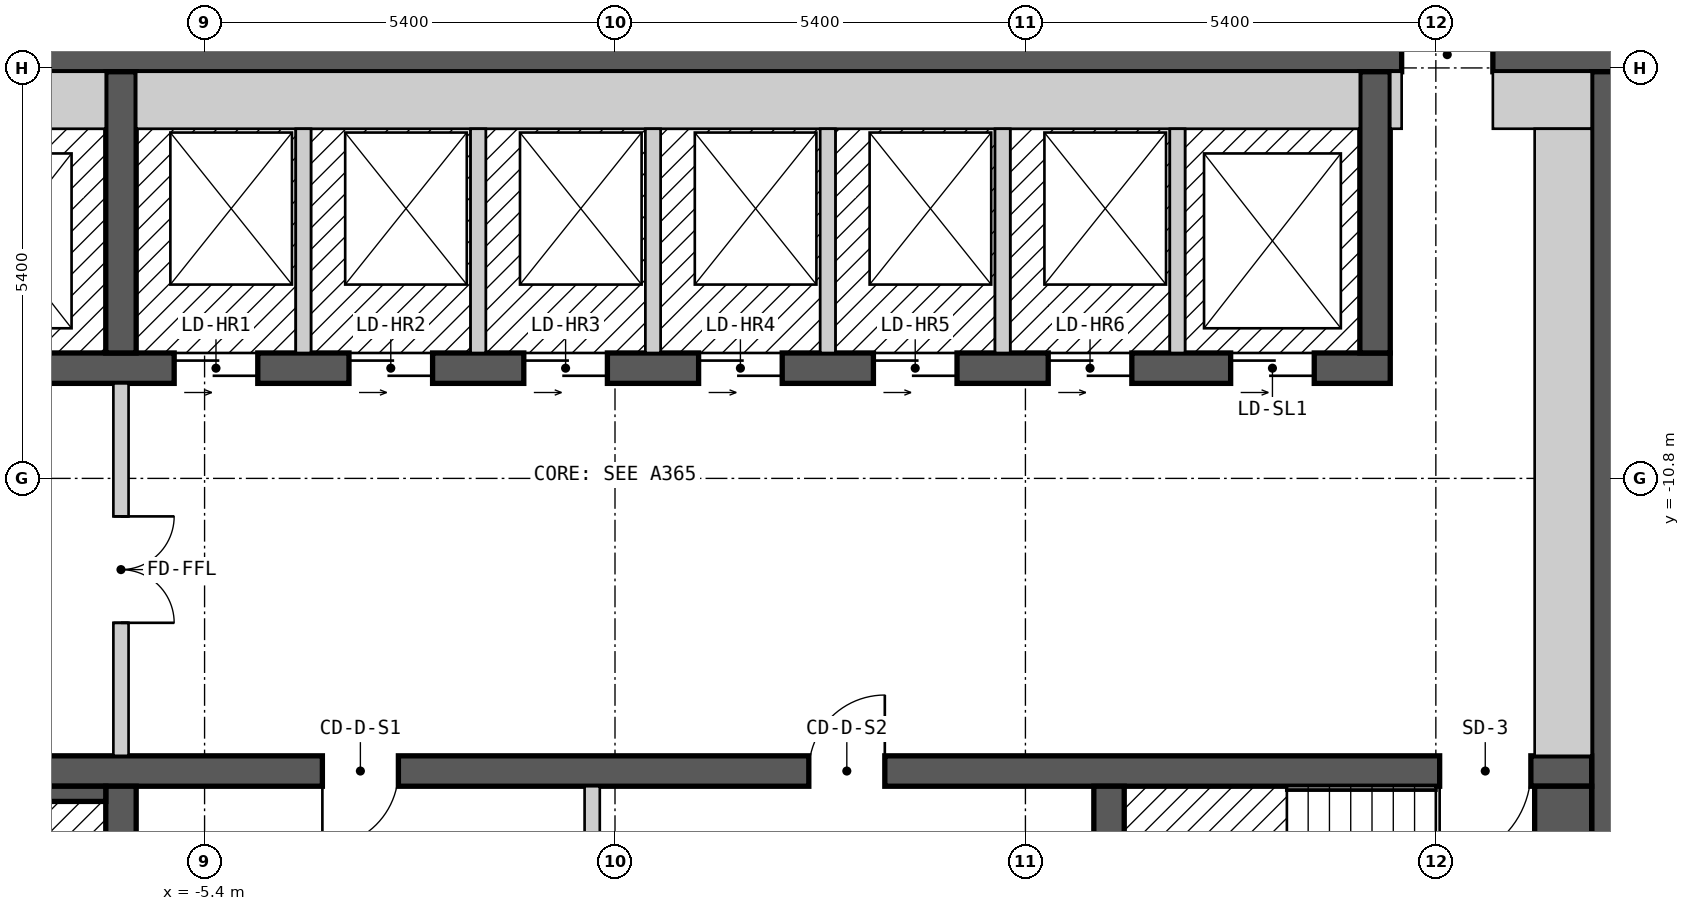
"""IFC4 building model, lengths in metres.
Left out: names, types, materials, properties, quantities, classifications, styles, units other than length and angle.
Written with IfcOpenShell. Run it as: python <this file> out.ifc"""

import sys

from ifc_helpers import new_model, si_unit, direction, frame, frame_2d, origin, place, context, subcontext, project, spatial, rectangle, extrude, element, fill, save


model = new_model("IFC4")
c1 = context("Model", 3, precision=1e-05, world=origin(), true_north=direction((0.0, 1.0)))
c2 = subcontext(c1, "Body", "Model", "MODEL_VIEW")
j1 = project(units=[si_unit("LENGTHUNIT", "METRE"), si_unit("PLANEANGLEUNIT", "RADIAN")], contexts=[c1])
p1 = place(None, origin())
s1 = spatial("IfcSite", under=j1, at=p1, CompositionType="ELEMENT")
p2 = place(p1, origin())
s2 = spatial("IfcBuilding", under=s1, at=p2, CompositionType="ELEMENT")
p3 = place(p2, frame((0.0, 0.0, 238.8)))
s3 = spatial("IfcBuildingStorey", under=s2, at=p3, CompositionType="ELEMENT", Elevation=238.8)
p4 = place(p3, frame((-13.3, -5.225, 0.0), z_axis=(0.0, 0.0, 1.0), x_axis=(1.0, 0.0, 0.0)))
e1 = element("IfcWall", 1, at=p4, inside=s3, PredefinedType="SHEAR", context=c2, shape_type="SweptSolid", body=[
    extrude(rectangle(XDim=26.6, YDim=0.45, at=frame_2d((13.3, 0.0))), origin(), (0.0, 0.0, 1.0), 2.7),
])
p5 = place(p4, frame((23.65, 0.0, 0.0)))
e2 = element("IfcOpeningElement", 2, at=p5, cuts=e1, PredefinedType="OPENING", context=c2, shape_type="SweptSolid", body=[
    extrude(rectangle(XDim=1.2, YDim=2.1, at=frame_2d((0.6, 1.05))), frame((0.0, 0.235, 0.0), z_axis=(0.0, -1.0, 0.0), x_axis=(1.0, 0.0, 0.0)), (0.0, 0.0, 1.0), 0.47),
])
p6 = place(p3, frame((13.075, -18.55, 0.0), z_axis=(0.0, 0.0, 1.0), x_axis=(0.0, 1.0, 0.0)))
e3 = element("IfcWall", 3, at=p6, inside=s3, PredefinedType="SHEAR", context=c2, shape_type="SweptSolid", body=[
    extrude(rectangle(XDim=13.1, YDim=0.45, at=frame_2d((6.55, 0.0))), origin(), (0.0, 0.0, 1.0), 2.7),
])
p7 = place(p3, frame((-12.85, -14.65, 0.0), z_axis=(0.0, 0.0, 1.0), x_axis=(1.0, 0.0, 0.0)))
e4 = element("IfcWall", 4, at=p7, inside=s3, PredefinedType="SHEAR", context=c2, shape_type="SweptSolid", body=[
    extrude(rectangle(XDim=25.7, YDim=0.4, at=frame_2d((12.85, 0.0))), origin(), (0.0, 0.0, 1.0), 2.7),
])
p8 = place(p7, frame((2.05, 0.0, 0.0), z_axis=(0.0, 0.0, 1.0), x_axis=(-1.0, 0.0, 0.0)))
e5 = element("IfcOpeningElement", 5, at=p8, cuts=e4, PredefinedType="OPENING", context=c2, shape_type="SweptSolid", body=[
    extrude(rectangle(XDim=1.2, YDim=2.1, at=frame_2d((0.6, 1.05))), frame((0.0, 0.21, 0.0), z_axis=(0.0, -1.0, 0.0), x_axis=(1.0, 0.0, 0.0)), (0.0, 0.0, 1.0), 0.42),
])
p9 = place(p7, frame((24.9, 0.0, 0.0), z_axis=(0.0, 0.0, 1.0), x_axis=(-1.0, 0.0, 0.0)))
e6 = element("IfcOpeningElement", 6, at=p9, cuts=e4, PredefinedType="OPENING", context=c2, shape_type="SweptSolid", body=[
    extrude(rectangle(XDim=1.2, YDim=2.1, at=frame_2d((0.6, 1.05))), frame((0.0, 0.21, 0.0), z_axis=(0.0, -1.0, 0.0), x_axis=(1.0, 0.0, 0.0)), (0.0, 0.0, 1.0), 0.42),
])
p10 = place(p7, frame((10.0, 0.0, 0.0), z_axis=(0.0, 0.0, 1.0), x_axis=(-1.0, 0.0, 0.0)))
e7 = element("IfcOpeningElement", 7, at=p10, cuts=e4, PredefinedType="OPENING", context=c2, shape_type="SweptSolid", body=[
    extrude(rectangle(XDim=1.0, YDim=2.1, at=frame_2d((0.5, 1.05))), frame((0.0, 0.21, 0.0), z_axis=(0.0, -1.0, 0.0), x_axis=(1.0, 0.0, 0.0)), (0.0, 0.0, 1.0), 0.42),
])
p11 = place(p7, frame((16.4, 0.0, 0.0), z_axis=(0.0, 0.0, 1.0), x_axis=(-1.0, 0.0, 0.0)))
e8 = element("IfcOpeningElement", 8, at=p11, cuts=e4, PredefinedType="OPENING", context=c2, shape_type="SweptSolid", body=[
    extrude(rectangle(XDim=1.0, YDim=2.1, at=frame_2d((0.5, 1.05))), frame((0.0, 0.21, 0.0), z_axis=(0.0, -1.0, 0.0), x_axis=(1.0, 0.0, 0.0)), (0.0, 0.0, 1.0), 0.42),
])
p12 = place(p3, frame((-12.85, -9.35, 0.0), z_axis=(0.0, 0.0, 1.0), x_axis=(1.0, 0.0, 0.0)))
e9 = element("IfcWall", 9, at=p12, inside=s3, PredefinedType="SHEAR", context=c2, shape_type="SweptSolid", body=[
    extrude(rectangle(XDim=23.05, YDim=0.4, at=frame_2d((11.525, 0.0))), origin(), (0.0, 0.0, 1.0), 2.7),
])
p13 = place(p12, frame((1.45, 0.0, 0.0)))
e10 = element("IfcOpeningElement", 10, at=p13, cuts=e9, PredefinedType="OPENING", context=c2, shape_type="SweptSolid", body=[
    extrude(rectangle(XDim=1.1, YDim=2.1, at=frame_2d((0.55, 1.05))), frame((0.0, 0.21, 0.0), z_axis=(0.0, -1.0, 0.0), x_axis=(1.0, 0.0, 0.0)), (0.0, 0.0, 1.0), 0.42),
])
p14 = place(p12, frame((4.25, 0.0, 0.0)))
e11 = element("IfcOpeningElement", 11, at=p14, cuts=e9, PredefinedType="OPENING", context=c2, shape_type="SweptSolid", body=[
    extrude(rectangle(XDim=1.1, YDim=2.1, at=frame_2d((0.55, 1.05))), frame((0.0, 0.21, 0.0), z_axis=(0.0, -1.0, 0.0), x_axis=(1.0, 0.0, 0.0)), (0.0, 0.0, 1.0), 0.42),
])
p15 = place(p12, frame((7.05, 0.0, 0.0)))
e12 = element("IfcOpeningElement", 12, at=p15, cuts=e9, PredefinedType="OPENING", context=c2, shape_type="SweptSolid", body=[
    extrude(rectangle(XDim=1.1, YDim=2.1, at=frame_2d((0.55, 1.05))), frame((0.0, 0.21, 0.0), z_axis=(0.0, -1.0, 0.0), x_axis=(1.0, 0.0, 0.0)), (0.0, 0.0, 1.0), 0.42),
])
p16 = place(p12, frame((9.35, 0.0, 0.0)))
e13 = element("IfcOpeningElement", 13, at=p16, cuts=e9, PredefinedType="OPENING", context=c2, shape_type="SweptSolid", body=[
    extrude(rectangle(XDim=1.1, YDim=2.1, at=frame_2d((0.55, 1.05))), frame((0.0, 0.21, 0.0), z_axis=(0.0, -1.0, 0.0), x_axis=(1.0, 0.0, 0.0)), (0.0, 0.0, 1.0), 0.42),
])
p17 = place(p12, frame((11.65, 0.0, 0.0)))
e14 = element("IfcOpeningElement", 14, at=p17, cuts=e9, PredefinedType="OPENING", context=c2, shape_type="SweptSolid", body=[
    extrude(rectangle(XDim=1.1, YDim=2.1, at=frame_2d((0.55, 1.05))), frame((0.0, 0.21, 0.0), z_axis=(0.0, -1.0, 0.0), x_axis=(1.0, 0.0, 0.0)), (0.0, 0.0, 1.0), 0.42),
])
p18 = place(p12, frame((13.95, 0.0, 0.0)))
e15 = element("IfcOpeningElement", 15, at=p18, cuts=e9, PredefinedType="OPENING", context=c2, shape_type="SweptSolid", body=[
    extrude(rectangle(XDim=1.1, YDim=2.1, at=frame_2d((0.55, 1.05))), frame((0.0, 0.21, 0.0), z_axis=(0.0, -1.0, 0.0), x_axis=(1.0, 0.0, 0.0)), (0.0, 0.0, 1.0), 0.42),
])
p19 = place(p12, frame((16.25, 0.0, 0.0)))
e16 = element("IfcOpeningElement", 16, at=p19, cuts=e9, PredefinedType="OPENING", context=c2, shape_type="SweptSolid", body=[
    extrude(rectangle(XDim=1.1, YDim=2.1, at=frame_2d((0.55, 1.05))), frame((0.0, 0.21, 0.0), z_axis=(0.0, -1.0, 0.0), x_axis=(1.0, 0.0, 0.0)), (0.0, 0.0, 1.0), 0.42),
])
p20 = place(p12, frame((18.55, 0.0, 0.0)))
e17 = element("IfcOpeningElement", 17, at=p20, cuts=e9, PredefinedType="OPENING", context=c2, shape_type="SweptSolid", body=[
    extrude(rectangle(XDim=1.1, YDim=2.1, at=frame_2d((0.55, 1.05))), frame((0.0, 0.21, 0.0), z_axis=(0.0, -1.0, 0.0), x_axis=(1.0, 0.0, 0.0)), (0.0, 0.0, 1.0), 0.42),
])
p21 = place(p12, frame((20.95, 0.0, 0.0)))
e18 = element("IfcOpeningElement", 18, at=p21, cuts=e9, PredefinedType="OPENING", context=c2, shape_type="SweptSolid", body=[
    extrude(rectangle(XDim=1.1, YDim=2.1, at=frame_2d((0.55, 1.05))), frame((0.0, 0.21, 0.0), z_axis=(0.0, -1.0, 0.0), x_axis=(1.0, 0.0, 0.0)), (0.0, 0.0, 1.0), 0.42),
])
for number, where, z_axis, x_axis in (
    (19, (-6.5, -18.55, 0.0), (0.0, 0.0, 1.0), (0.0, 1.0, 0.0)),
    (20, (6.5, -18.55, 0.0), (0.0, 0.0, 1.0), (0.0, 1.0, 0.0)),
    (21, (-6.5, -9.15, 0.0), (0.0, 0.0, 1.0), (0.0, 1.0, 0.0)),
    (22, (10.0, -9.15, 0.0), (0.0, 0.0, 1.0), (0.0, 1.0, 0.0)),
):
    element("IfcWall", number, at=place(p3, frame(where, z_axis=z_axis, x_axis=x_axis)), inside=s3, PredefinedType="SHEAR", context=c2, shape_type="SweptSolid", body=[
        extrude(rectangle(XDim=3.7, YDim=0.4, at=frame_2d((1.85, 0.0))), origin(), (0.0, 0.0, 1.0), 2.7),
    ])
p22 = place(p3, frame((-12.1, -5.825, 0.0), z_axis=(0.0, 0.0, 1.0), x_axis=(1.0, 0.0, 0.0)))
e23 = element("IfcWall", 23, at=p22, inside=s3, PredefinedType="SOLIDWALL", context=c2, shape_type="SweptSolid", body=[
    extrude(rectangle(XDim=5.4, YDim=0.75, at=frame_2d((2.7, 0.0))), origin(), (0.0, 0.0, 1.0), 2.7),
])
p23 = place(p3, frame((-10.8, -14.95, 0.0), z_axis=(0.0, 0.0, 1.0), x_axis=(1.0, 0.0, 0.0)))
e24 = element("IfcWall", 24, at=p23, inside=s3, PredefinedType="SOLIDWALL", context=c2, shape_type="SweptSolid", body=[
    extrude(rectangle(XDim=4.1, YDim=0.2, at=frame_2d((2.05, 0.0))), origin(), (0.0, 0.0, 1.0), 2.7),
])
p24 = place(p3, frame((-6.5, -14.45, 0.0), z_axis=(0.0, 0.0, 1.0), x_axis=(0.0, 1.0, 0.0)))
e25 = element("IfcWall", 25, at=p24, inside=s3, PredefinedType="PARTITIONING", context=c2, shape_type="SweptSolid", body=[
    extrude(rectangle(XDim=4.9, YDim=0.2, at=frame_2d((2.45, 0.0))), origin(), (0.0, 0.0, 1.0), 2.7),
])
p25 = place(p24, frame((3.15, 0.0, 0.0), z_axis=(0.0, 0.0, 1.0), x_axis=(-1.0, 0.0, 0.0)))
e26 = element("IfcOpeningElement", 26, at=p25, cuts=e25, PredefinedType="OPENING", context=c2, shape_type="SweptSolid", body=[
    extrude(rectangle(XDim=1.4, YDim=2.1, at=frame_2d((0.7, 1.05))), frame((0.0, 0.11, 0.0), z_axis=(0.0, -1.0, 0.0), x_axis=(1.0, 0.0, 0.0)), (0.0, 0.0, 1.0), 0.22),
])
p26 = place(p3, frame((-6.3, -5.825, 0.0), z_axis=(0.0, 0.0, 1.0), x_axis=(1.0, 0.0, 0.0)))
e27 = element("IfcWall", 27, at=p26, inside=s3, PredefinedType="SOLIDWALL", context=c2, shape_type="SweptSolid", body=[
    extrude(rectangle(XDim=16.1, YDim=0.75, at=frame_2d((8.05, 0.0))), origin(), (0.0, 0.0, 1.0), 2.7),
])
for number, where, z_axis, x_axis in (
    (28, (-4.1, -9.15, 0.0), (0.0, 0.0, 1.0), (0.0, 1.0, 0.0)),
    (29, (-1.8, -9.15, 0.0), (0.0, 0.0, 1.0), (0.0, 1.0, 0.0)),
):
    element("IfcWall", number, at=place(p3, frame(where, z_axis=z_axis, x_axis=x_axis)), inside=s3, PredefinedType="SOLIDWALL", context=c2, shape_type="SweptSolid", body=[
        extrude(rectangle(XDim=2.95, YDim=0.2, at=frame_2d((1.475, 0.0))), origin(), (0.0, 0.0, 1.0), 2.7),
    ])
p27 = place(p3, frame((-0.3, -17.8, 0.0), z_axis=(0.0, 0.0, 1.0), x_axis=(0.0, 1.0, 0.0)))
e30 = element("IfcWall", 30, at=p27, inside=s3, PredefinedType="PARTITIONING", context=c2, shape_type="SweptSolid", body=[
    extrude(rectangle(XDim=2.95, YDim=0.2, at=frame_2d((1.475, 0.0))), origin(), (0.0, 0.0, 1.0), 2.7),
])
for number, where, z_axis, x_axis in (
    (31, (0.5, -9.15, 0.0), (0.0, 0.0, 1.0), (0.0, 1.0, 0.0)),
    (32, (2.8, -9.15, 0.0), (0.0, 0.0, 1.0), (0.0, 1.0, 0.0)),
    (33, (5.1, -9.15, 0.0), (0.0, 0.0, 1.0), (0.0, 1.0, 0.0)),
    (34, (7.4, -9.15, 0.0), (0.0, 0.0, 1.0), (0.0, 1.0, 0.0)),
):
    element("IfcWall", number, at=place(p3, frame(where, z_axis=z_axis, x_axis=x_axis)), inside=s3, PredefinedType="SOLIDWALL", context=c2, shape_type="SweptSolid", body=[
        extrude(rectangle(XDim=2.95, YDim=0.2, at=frame_2d((1.475, 0.0))), origin(), (0.0, 0.0, 1.0), 2.7),
    ])
p28 = place(p3, frame((10.275, -6.2, 0.0), z_axis=(0.0, 0.0, 1.0), x_axis=(0.0, 1.0, 0.0)))
e35 = element("IfcWall", 35, at=p28, inside=s3, PredefinedType="PARTITIONING", context=c2, shape_type="SweptSolid", body=[
    extrude(rectangle(XDim=0.75, YDim=0.15, at=frame_2d((0.375, 0.0))), origin(), (0.0, 0.0, 1.0), 2.7),
])
p29 = place(p3, frame((11.55, -5.825, 0.0), z_axis=(0.0, 0.0, 1.0), x_axis=(1.0, 0.0, 0.0)))
e36 = element("IfcWall", 36, at=p29, inside=s3, PredefinedType="PARTITIONING", context=c2, shape_type="SweptSolid", body=[
    extrude(rectangle(XDim=1.3, YDim=0.75, at=frame_2d((0.65, 0.0))), origin(), (0.0, 0.0, 1.0), 2.7),
])
p30 = place(p3, frame((12.475, -17.6, 0.0), z_axis=(0.0, 0.0, 1.0), x_axis=(0.0, 1.0, 0.0)))
e37 = element("IfcWall", 37, at=p30, inside=s3, PredefinedType="SOLIDWALL", context=c2, shape_type="SweptSolid", body=[
    extrude(rectangle(XDim=2.75, YDim=0.75, at=frame_2d((1.375, 0.0))), origin(), (0.0, 0.0, 1.0), 2.7),
])
p31 = place(p3, frame((12.475, -14.45, 0.0), z_axis=(0.0, 0.0, 1.0), x_axis=(0.0, 1.0, 0.0)))
e38 = element("IfcWall", 38, at=p31, inside=s3, PredefinedType="PARTITIONING", context=c2, shape_type="SweptSolid", body=[
    extrude(rectangle(XDim=8.25, YDim=0.75, at=frame_2d((4.125, 0.0))), origin(), (0.0, 0.0, 1.0), 2.7),
])
p32 = place(p15, origin())
e39 = element("IfcDoor", 39, at=p32, inside=s3, OperationType="DOUBLE_DOOR_SLIDING", PredefinedType="DOOR", context=c2, shape_type="SweptSolid", body=[
    extrude(rectangle(XDim=1.1, YDim=2.1, at=frame_2d((0.55, 1.05))), frame((0.0, 0.025, 0.0), z_axis=(0.0, -1.0, 0.0), x_axis=(1.0, 0.0, 0.0)), (0.0, 0.0, 1.0), 0.05),
])
fill(e12, e39)
p33 = place(p16, origin())
e40 = element("IfcDoor", 40, at=p33, inside=s3, OperationType="DOUBLE_DOOR_SLIDING", PredefinedType="DOOR", context=c2, shape_type="SweptSolid", body=[
    extrude(rectangle(XDim=1.1, YDim=2.1, at=frame_2d((0.55, 1.05))), frame((0.0, 0.025, 0.0), z_axis=(0.0, -1.0, 0.0), x_axis=(1.0, 0.0, 0.0)), (0.0, 0.0, 1.0), 0.05),
])
fill(e13, e40)
p34 = place(p17, origin())
e41 = element("IfcDoor", 41, at=p34, inside=s3, OperationType="DOUBLE_DOOR_SLIDING", PredefinedType="DOOR", context=c2, shape_type="SweptSolid", body=[
    extrude(rectangle(XDim=1.1, YDim=2.1, at=frame_2d((0.55, 1.05))), frame((0.0, 0.025, 0.0), z_axis=(0.0, -1.0, 0.0), x_axis=(1.0, 0.0, 0.0)), (0.0, 0.0, 1.0), 0.05),
])
fill(e14, e41)
p35 = place(p18, origin())
e42 = element("IfcDoor", 42, at=p35, inside=s3, OperationType="DOUBLE_DOOR_SLIDING", PredefinedType="DOOR", context=c2, shape_type="SweptSolid", body=[
    extrude(rectangle(XDim=1.1, YDim=2.1, at=frame_2d((0.55, 1.05))), frame((0.0, 0.025, 0.0), z_axis=(0.0, -1.0, 0.0), x_axis=(1.0, 0.0, 0.0)), (0.0, 0.0, 1.0), 0.05),
])
fill(e15, e42)
p36 = place(p19, origin())
e43 = element("IfcDoor", 43, at=p36, inside=s3, OperationType="DOUBLE_DOOR_SLIDING", PredefinedType="DOOR", context=c2, shape_type="SweptSolid", body=[
    extrude(rectangle(XDim=1.1, YDim=2.1, at=frame_2d((0.55, 1.05))), frame((0.0, 0.025, 0.0), z_axis=(0.0, -1.0, 0.0), x_axis=(1.0, 0.0, 0.0)), (0.0, 0.0, 1.0), 0.05),
])
fill(e16, e43)
p37 = place(p20, origin())
e44 = element("IfcDoor", 44, at=p37, inside=s3, OperationType="DOUBLE_DOOR_SLIDING", PredefinedType="DOOR", context=c2, shape_type="SweptSolid", body=[
    extrude(rectangle(XDim=1.1, YDim=2.1, at=frame_2d((0.55, 1.05))), frame((0.0, 0.025, 0.0), z_axis=(0.0, -1.0, 0.0), x_axis=(1.0, 0.0, 0.0)), (0.0, 0.0, 1.0), 0.05),
])
fill(e17, e44)
p38 = place(p21, origin())
e45 = element("IfcDoor", 45, at=p38, inside=s3, OperationType="DOUBLE_DOOR_SLIDING", PredefinedType="DOOR", context=c2, shape_type="SweptSolid", body=[
    extrude(rectangle(XDim=1.1, YDim=2.1, at=frame_2d((0.55, 1.05))), frame((0.0, 0.025, 0.0), z_axis=(0.0, -1.0, 0.0), x_axis=(1.0, 0.0, 0.0)), (0.0, 0.0, 1.0), 0.05),
])
fill(e18, e45)
p39 = place(p9, origin())
e46 = element("IfcDoor", 46, at=p39, inside=s3, OperationType="SINGLE_SWING_RIGHT", PredefinedType="DOOR", context=c2, shape_type="SweptSolid", body=[
    extrude(rectangle(XDim=1.2, YDim=2.1, at=frame_2d((0.6, 1.05))), frame((0.0, 0.025, 0.0), z_axis=(0.0, -1.0, 0.0), x_axis=(1.0, 0.0, 0.0)), (0.0, 0.0, 1.0), 0.05),
])
fill(e6, e46)
p40 = place(p25, origin())
e47 = element("IfcDoor", 47, at=p40, inside=s3, OperationType="DOUBLE_DOOR_SINGLE_SWING", PredefinedType="DOOR", context=c2, shape_type="SweptSolid", body=[
    extrude(rectangle(XDim=1.4, YDim=2.1, at=frame_2d((0.7, 1.05))), frame((0.0, 0.025, 0.0), z_axis=(0.0, -1.0, 0.0), x_axis=(1.0, 0.0, 0.0)), (0.0, 0.0, 1.0), 0.05),
])
fill(e26, e47)
p41 = place(p5, origin())
e48 = element("IfcDoor", 48, at=p41, inside=s3, OperationType="DOUBLE_DOOR_SINGLE_SWING", PredefinedType="DOOR", context=c2, shape_type="SweptSolid", body=[
    extrude(rectangle(XDim=1.2, YDim=2.1, at=frame_2d((0.6, 1.05))), frame((0.0, 0.025, 0.0), z_axis=(0.0, -1.0, 0.0), x_axis=(1.0, 0.0, 0.0)), (0.0, 0.0, 1.0), 0.05),
])
fill(e2, e48)
p42 = place(p10, origin())
e49 = element("IfcDoor", 49, at=p42, inside=s3, OperationType="SINGLE_SWING_RIGHT", PredefinedType="DOOR", context=c2, shape_type="SweptSolid", body=[
    extrude(rectangle(XDim=1.0, YDim=2.1, at=frame_2d((0.5, 1.05))), frame((0.0, 0.025, 0.0), z_axis=(0.0, -1.0, 0.0), x_axis=(1.0, 0.0, 0.0)), (0.0, 0.0, 1.0), 0.05),
])
fill(e7, e49)
p43 = place(p11, origin())
e50 = element("IfcDoor", 50, at=p43, inside=s3, OperationType="SINGLE_SWING_LEFT", PredefinedType="DOOR", context=c2, shape_type="SweptSolid", body=[
    extrude(rectangle(XDim=1.0, YDim=2.1, at=frame_2d((0.5, 1.05))), frame((0.0, 0.025, 0.0), z_axis=(0.0, -1.0, 0.0), x_axis=(1.0, 0.0, 0.0)), (0.0, 0.0, 1.0), 0.05),
])
fill(e8, e50)
save(model, sys.argv[1])
